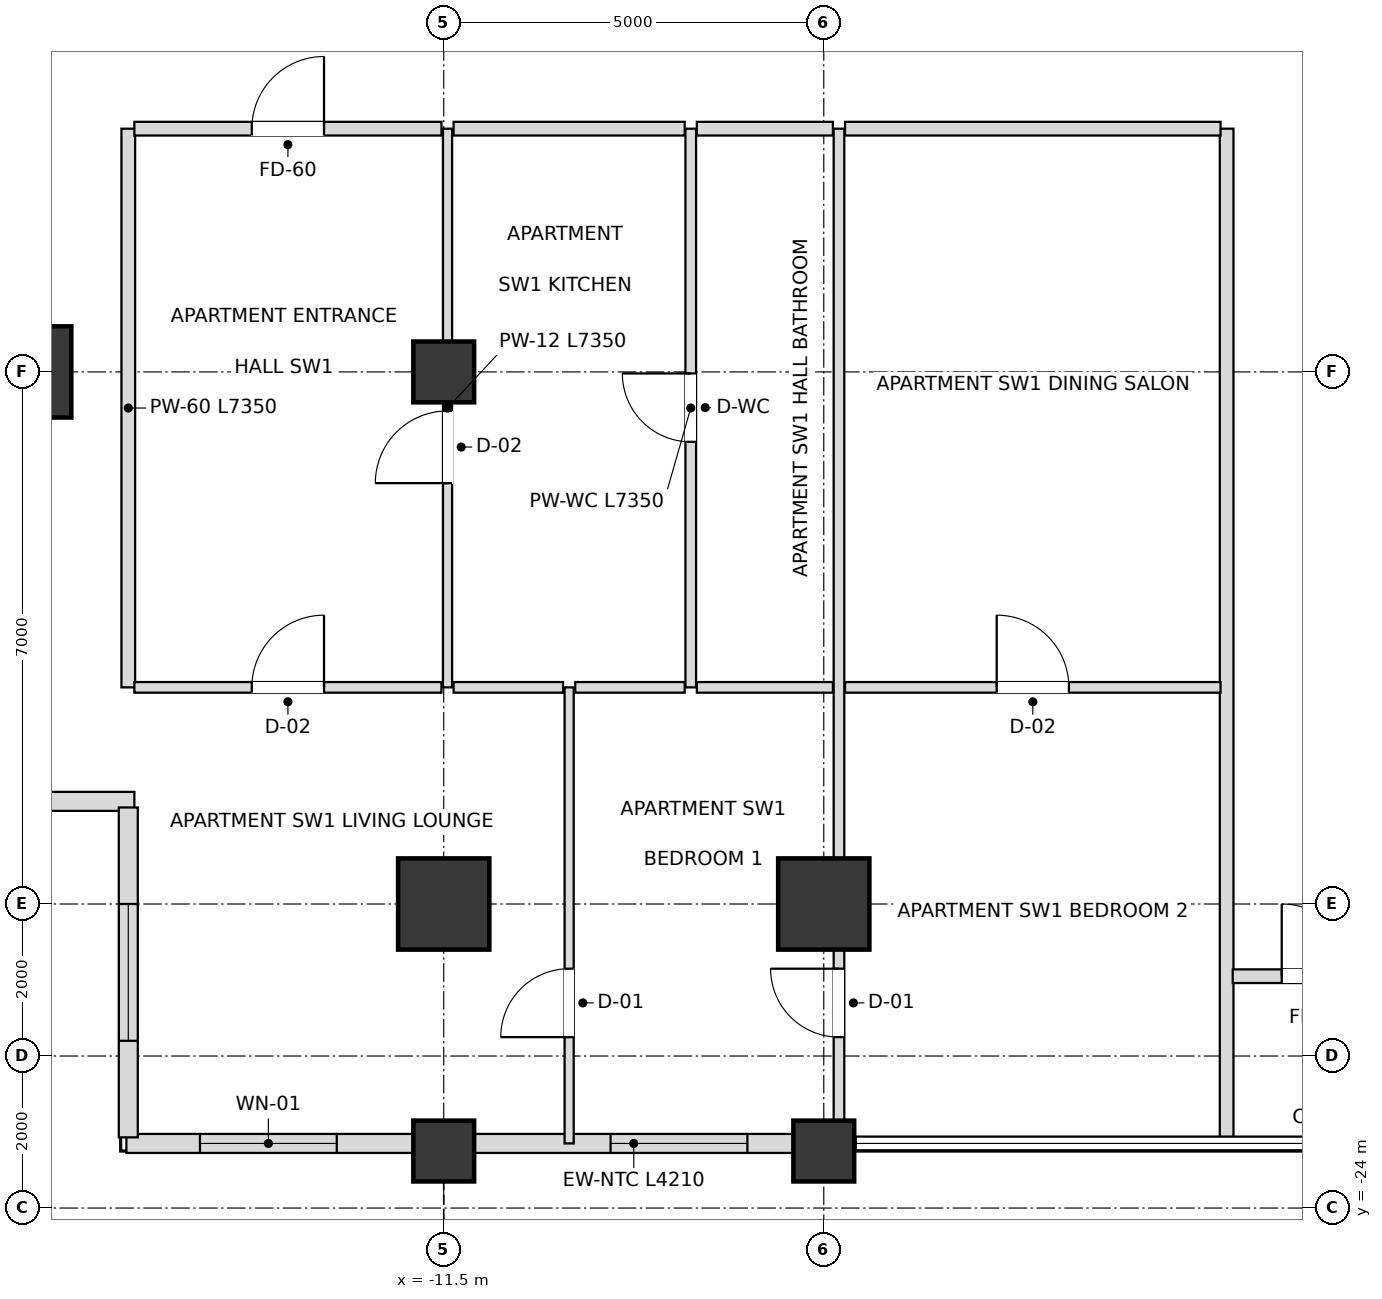
"""IFC4 building model, lengths in metres.
Left out: names, types, materials, properties, quantities, classifications, styles, units other than length and angle.
Written with IfcOpenShell. Run it as: python <this file> out.ifc"""

import sys

from ifc_helpers import new_model, si_unit, direction, frame, frame_2d, origin, origin_2d, place, context, subcontext, project, spatial, rectangle, extrude, element, fill, save


model = new_model("IFC4")
c1 = context("Model", 3, precision=1e-05, world=origin(), true_north=direction((0.0, 1.0)))
c2 = subcontext(c1, "Body", "Model", "MODEL_VIEW")
j1 = project(units=[si_unit("LENGTHUNIT", "METRE"), si_unit("PLANEANGLEUNIT", "RADIAN")], contexts=[c1])
p1 = place(None, origin())
s1 = spatial("IfcSite", under=j1, at=p1, CompositionType="ELEMENT")
p2 = place(p1, origin())
s2 = spatial("IfcBuilding", under=s1, at=p2, CompositionType="ELEMENT")
p3 = place(p2, frame((0.0, 0.0, 133.2)))
s3 = spatial("IfcBuildingStorey", under=s2, at=p3, CompositionType="ELEMENT", Elevation=133.2)
for number, where, z_axis, x_axis in (
    (1, (-11.5, -20.0, 0.0), (0.0, 0.0, 1.0), (1.0, 0.0, 0.0)),
    (2, (-6.5, -20.0, 0.0), (0.0, 0.0, 1.0), (1.0, 0.0, 0.0)),
    (3, (-17.0, -13.0, 0.0), (0.0, 0.0, 1.0), (1.0, 0.0, 0.0)),
):
    element("IfcColumn", number, at=place(p3, frame(where, z_axis=z_axis, x_axis=x_axis)), inside=s3, PredefinedType="USERDEFINED", context=c2, shape_type="SweptSolid", body=[
        extrude(rectangle(XDim=1.2, YDim=1.2, at=origin_2d()), origin(), (0.0, 0.0, 1.0), 3.6),
    ])
for number, where, z_axis, x_axis in (
    (4, (-11.5, -13.0, 0.0), (0.0, 0.0, 1.0), (1.0, 0.0, 0.0)),
    (5, (-11.5, -23.25, 0.0), (0.0, 0.0, 1.0), (1.0, 0.0, 0.0)),
    (6, (-6.5, -23.25, 0.0), (0.0, 0.0, 1.0), (1.0, 0.0, 0.0)),
):
    element("IfcColumn", number, at=place(p3, frame(where, z_axis=z_axis, x_axis=x_axis)), inside=s3, PredefinedType="COLUMN", context=c2, shape_type="SweptSolid", body=[
        extrude(rectangle(XDim=0.8, YDim=0.8, at=origin_2d()), origin(), (0.0, 0.0, 1.0), 3.6),
    ])
p4 = place(p3, frame((-15.675, -23.15, 0.0), z_axis=(0.0, 0.0, 1.0), x_axis=(1.0, 0.0, 0.0)))
e7 = element("IfcWall", 7, at=p4, inside=s3, PredefinedType="SOLIDWALL", context=c2, shape_type="SweptSolid", body=[
    extrude(rectangle(XDim=3.78, YDim=0.25, at=frame_2d((1.89, 0.0))), origin(), (0.0, 0.0, 1.0), 2.736),
])
p5 = place(p4, frame((0.968, 0.0, 0.72)))
e8 = element("IfcOpeningElement", 8, at=p5, cuts=e7, PredefinedType="OPENING", context=c2, shape_type="SweptSolid", body=[
    extrude(rectangle(XDim=1.8, YDim=1.68, at=frame_2d((0.9, 0.84))), frame((0.0, 0.135, 0.0), z_axis=(0.0, -1.0, 0.0), x_axis=(1.0, 0.0, 0.0)), (0.0, 0.0, 1.0), 0.27),
])
p6 = place(p3, frame((-11.105, -23.15, 0.0), z_axis=(0.0, 0.0, 1.0), x_axis=(1.0, 0.0, 0.0)))
e9 = element("IfcWall", 9, at=p6, inside=s3, PredefinedType="SOLIDWALL", context=c2, shape_type="SweptSolid", body=[
    extrude(rectangle(XDim=4.21, YDim=0.25, at=frame_2d((2.105, 0.0))), origin(), (0.0, 0.0, 1.0), 2.736),
])
p7 = place(p6, frame((1.8, 0.0, 0.72)))
e10 = element("IfcOpeningElement", 10, at=p7, cuts=e9, PredefinedType="OPENING", context=c2, shape_type="SweptSolid", body=[
    extrude(rectangle(XDim=1.8, YDim=1.68, at=frame_2d((0.9, 0.84))), frame((0.0, 0.135, 0.0), z_axis=(0.0, -1.0, 0.0), x_axis=(1.0, 0.0, 0.0)), (0.0, 0.0, 1.0), 0.27),
])
p8 = place(p3, frame((-20.23, -18.65, 0.0), z_axis=(0.0, 0.0, 1.0), x_axis=(1.0, 0.0, 0.0)))
e11 = element("IfcWall", 11, at=p8, inside=s3, PredefinedType="SOLIDWALL", context=c2, shape_type="SweptSolid", body=[
    extrude(rectangle(XDim=4.66, YDim=0.25, at=frame_2d((2.33, 0.0))), origin(), (0.0, 0.0, 1.0), 2.736),
])
p9 = place(p8, frame((1.43, 0.0, 0.72)))
e12 = element("IfcOpeningElement", 12, at=p9, cuts=e11, PredefinedType="OPENING", context=c2, shape_type="SweptSolid", body=[
    extrude(rectangle(XDim=1.8, YDim=1.68, at=frame_2d((0.9, 0.84))), frame((0.0, 0.135, 0.0), z_axis=(0.0, -1.0, 0.0), x_axis=(1.0, 0.0, 0.0)), (0.0, 0.0, 1.0), 0.27),
])
p10 = place(p3, frame((-15.65, -18.73, 0.0), z_axis=(0.0, 0.0, 1.0), x_axis=(0.0, -1.0, 0.0)))
e13 = element("IfcWall", 13, at=p10, inside=s3, PredefinedType="SOLIDWALL", context=c2, shape_type="SweptSolid", body=[
    extrude(rectangle(XDim=4.34, YDim=0.25, at=frame_2d((2.17, 0.0))), origin(), (0.0, 0.0, 1.0), 2.736),
])
p11 = place(p10, frame((1.27, 0.0, 0.72)))
e14 = element("IfcOpeningElement", 14, at=p11, cuts=e13, PredefinedType="OPENING", context=c2, shape_type="SweptSolid", body=[
    extrude(rectangle(XDim=1.8, YDim=1.68, at=frame_2d((0.9, 0.84))), frame((0.0, 0.135, 0.0), z_axis=(0.0, -1.0, 0.0), x_axis=(1.0, 0.0, 0.0)), (0.0, 0.0, 1.0), 0.27),
])
p12 = place(p3, frame((-15.65, -17.15, 0.0), z_axis=(0.0, 0.0, 1.0), x_axis=(0.0, 1.0, 0.0)))
e15 = element("IfcWall", 15, at=p12, inside=s3, PredefinedType="PARTITIONING", context=c2, shape_type="SweptSolid", body=[
    extrude(rectangle(XDim=7.35, YDim=0.18, at=frame_2d((3.675, 0.0))), origin(), (0.0, 0.0, 1.0), 2.736),
])
p13 = place(p3, frame((-11.45, -17.15, 0.0), z_axis=(0.0, 0.0, 1.0), x_axis=(0.0, 1.0, 0.0)))
e16 = element("IfcWall", 16, at=p13, inside=s3, PredefinedType="PARTITIONING", context=c2, shape_type="SweptSolid", body=[
    extrude(rectangle(XDim=7.35, YDim=0.12, at=frame_2d((3.675, 0.0))), origin(), (0.0, 0.0, 1.0), 2.736),
])
p14 = place(p13, frame((2.687, 0.0, 0.0)))
e17 = element("IfcOpeningElement", 17, at=p14, cuts=e16, PredefinedType="OPENING", context=c2, shape_type="SweptSolid", body=[
    extrude(rectangle(XDim=0.95, YDim=2.1, at=frame_2d((0.475, 1.05))), frame((0.0, 0.07, 0.0), z_axis=(0.0, -1.0, 0.0), x_axis=(1.0, 0.0, 0.0)), (0.0, 0.0, 1.0), 0.14),
])
p15 = place(p3, frame((-9.85, -23.15, 0.0), z_axis=(0.0, 0.0, 1.0), x_axis=(0.0, 1.0, 0.0)))
e18 = element("IfcWall", 18, at=p15, inside=s3, PredefinedType="PARTITIONING", context=c2, shape_type="SweptSolid", body=[
    extrude(rectangle(XDim=6.0, YDim=0.12, at=frame_2d((3.0, 0.0))), origin(), (0.0, 0.0, 1.0), 2.816),
])
p16 = place(p15, frame((1.399, 0.0, 0.0)))
e19 = element("IfcOpeningElement", 19, at=p16, cuts=e18, PredefinedType="OPENING", context=c2, shape_type="SweptSolid", body=[
    extrude(rectangle(XDim=0.9, YDim=2.1, at=frame_2d((0.45, 1.05))), frame((0.0, 0.07, 0.0), z_axis=(0.0, -1.0, 0.0), x_axis=(1.0, 0.0, 0.0)), (0.0, 0.0, 1.0), 0.14),
])
p17 = place(p3, frame((-8.25, -17.15, 0.0), z_axis=(0.0, 0.0, 1.0), x_axis=(0.0, 1.0, 0.0)))
e20 = element("IfcWall", 20, at=p17, inside=s3, PredefinedType="PARTITIONING", context=c2, shape_type="SweptSolid", body=[
    extrude(rectangle(XDim=7.35, YDim=0.14, at=frame_2d((3.675, 0.0))), origin(), (0.0, 0.0, 1.0), 2.816),
])
p18 = place(p17, frame((3.23, 0.0, 0.0)))
e21 = element("IfcOpeningElement", 21, at=p18, cuts=e20, PredefinedType="OPENING", context=c2, shape_type="SweptSolid", body=[
    extrude(rectangle(XDim=0.9, YDim=2.1, at=frame_2d((0.45, 1.05))), frame((0.0, 0.08, 0.0), z_axis=(0.0, -1.0, 0.0), x_axis=(1.0, 0.0, 0.0)), (0.0, 0.0, 1.0), 0.16),
])
p19 = place(p3, frame((-6.3, -23.15, 0.0), z_axis=(0.0, 0.0, 1.0), x_axis=(0.0, 1.0, 0.0)))
e22 = element("IfcWall", 22, at=p19, inside=s3, PredefinedType="PARTITIONING", context=c2, shape_type="SweptSolid", body=[
    extrude(rectangle(XDim=13.35, YDim=0.14, at=frame_2d((6.675, 0.0))), origin(), (0.0, 0.0, 1.0), 2.816),
])
p20 = place(p19, frame((1.399, 0.0, 0.0)))
e23 = element("IfcOpeningElement", 23, at=p20, cuts=e22, PredefinedType="OPENING", context=c2, shape_type="SweptSolid", body=[
    extrude(rectangle(XDim=0.9, YDim=2.1, at=frame_2d((0.45, 1.05))), frame((0.0, 0.08, 0.0), z_axis=(0.0, -1.0, 0.0), x_axis=(1.0, 0.0, 0.0)), (0.0, 0.0, 1.0), 0.16),
])
p21 = place(p3, frame((-1.2, -23.15, 0.0), z_axis=(0.0, 0.0, 1.0), x_axis=(0.0, 1.0, 0.0)))
e24 = element("IfcWall", 24, at=p21, inside=s3, PredefinedType="PARTITIONING", context=c2, shape_type="SweptSolid", body=[
    extrude(rectangle(XDim=13.35, YDim=0.18, at=frame_2d((6.675, 0.0))), origin(), (0.0, 0.0, 1.0), 2.816),
])
p22 = place(p3, frame((-1.12, -20.95, 0.0), z_axis=(0.0, 0.0, 1.0), x_axis=(1.0, 0.0, 0.0)))
e25 = element("IfcWall", 25, at=p22, inside=s3, PredefinedType="PARTITIONING", context=c2, shape_type="SweptSolid", body=[
    extrude(rectangle(XDim=2.24, YDim=0.18, at=frame_2d((1.12, 0.0))), origin(), (0.0, 0.0, 1.0), 3.38),
])
p23 = place(p22, frame((0.645, 0.0, 0.0)))
e26 = element("IfcOpeningElement", 26, at=p23, cuts=e25, PredefinedType="OPENING", context=c2, shape_type="SweptSolid", body=[
    extrude(rectangle(XDim=0.95, YDim=2.15, at=frame_2d((0.475, 1.075))), frame((0.0, 0.1, 0.0), z_axis=(0.0, -1.0, 0.0), x_axis=(1.0, 0.0, 0.0)), (0.0, 0.0, 1.0), 0.2),
])
p24 = place(p3, frame((-15.57, -17.15, 0.0), z_axis=(0.0, 0.0, 1.0), x_axis=(1.0, 0.0, 0.0)))
e27 = element("IfcWall", 27, at=p24, inside=s3, PredefinedType="PARTITIONING", context=c2, shape_type="SweptSolid", body=[
    extrude(rectangle(XDim=4.04, YDim=0.14, at=frame_2d((2.02, 0.0))), origin(), (0.0, 0.0, 1.0), 2.736),
])
p25 = place(p24, frame((1.545, 0.0, 0.0)))
e28 = element("IfcOpeningElement", 28, at=p25, cuts=e27, PredefinedType="OPENING", context=c2, shape_type="SweptSolid", body=[
    extrude(rectangle(XDim=0.95, YDim=2.1, at=frame_2d((0.475, 1.05))), frame((0.0, 0.08, 0.0), z_axis=(0.0, -1.0, 0.0), x_axis=(1.0, 0.0, 0.0)), (0.0, 0.0, 1.0), 0.16),
])
p26 = place(p3, frame((-11.37, -17.15, 0.0), z_axis=(0.0, 0.0, 1.0), x_axis=(1.0, 0.0, 0.0)))
e29 = element("IfcWall", 29, at=p26, inside=s3, PredefinedType="PARTITIONING", context=c2, shape_type="SweptSolid", body=[
    extrude(rectangle(XDim=1.44, YDim=0.14, at=frame_2d((0.72, 0.0))), origin(), (0.0, 0.0, 1.0), 3.38),
])
p27 = place(p3, frame((-9.77, -17.15, 0.0), z_axis=(0.0, 0.0, 1.0), x_axis=(1.0, 0.0, 0.0)))
e30 = element("IfcWall", 30, at=p27, inside=s3, PredefinedType="PARTITIONING", context=c2, shape_type="SweptSolid", body=[
    extrude(rectangle(XDim=1.44, YDim=0.14, at=frame_2d((0.72, 0.0))), origin(), (0.0, 0.0, 1.0), 3.38),
])
p28 = place(p3, frame((-8.17, -17.15, 0.0), z_axis=(0.0, 0.0, 1.0), x_axis=(1.0, 0.0, 0.0)))
e31 = element("IfcWall", 31, at=p28, inside=s3, PredefinedType="PARTITIONING", context=c2, shape_type="SweptSolid", body=[
    extrude(rectangle(XDim=1.79, YDim=0.14, at=frame_2d((0.895, 0.0))), origin(), (0.0, 0.0, 1.0), 2.816),
])
p29 = place(p3, frame((-6.22, -17.15, 0.0), z_axis=(0.0, 0.0, 1.0), x_axis=(1.0, 0.0, 0.0)))
e32 = element("IfcWall", 32, at=p29, inside=s3, PredefinedType="PARTITIONING", context=c2, shape_type="SweptSolid", body=[
    extrude(rectangle(XDim=4.94, YDim=0.14, at=frame_2d((2.47, 0.0))), origin(), (0.0, 0.0, 1.0), 3.38),
])
p30 = place(p29, frame((1.995, 0.0, 0.0)))
e33 = element("IfcOpeningElement", 33, at=p30, cuts=e32, PredefinedType="OPENING", context=c2, shape_type="SweptSolid", body=[
    extrude(rectangle(XDim=0.95, YDim=2.1, at=frame_2d((0.475, 1.05))), frame((0.0, 0.08, 0.0), z_axis=(0.0, -1.0, 0.0), x_axis=(1.0, 0.0, 0.0)), (0.0, 0.0, 1.0), 0.16),
])
p31 = place(p3, frame((-15.57, -9.8, 0.0), z_axis=(0.0, 0.0, 1.0), x_axis=(1.0, 0.0, 0.0)))
e34 = element("IfcWall", 34, at=p31, inside=s3, PredefinedType="PARTITIONING", context=c2, shape_type="SweptSolid", body=[
    extrude(rectangle(XDim=4.04, YDim=0.18, at=frame_2d((2.02, 0.0))), origin(), (0.0, 0.0, 1.0), 3.38),
])
p32 = place(p31, frame((1.545, 0.0, 0.0)))
e35 = element("IfcOpeningElement", 35, at=p32, cuts=e34, PredefinedType="OPENING", context=c2, shape_type="SweptSolid", body=[
    extrude(rectangle(XDim=0.95, YDim=2.15, at=frame_2d((0.475, 1.075))), frame((0.0, 0.1, 0.0), z_axis=(0.0, -1.0, 0.0), x_axis=(1.0, 0.0, 0.0)), (0.0, 0.0, 1.0), 0.2),
])
p33 = place(p3, frame((-11.37, -9.8, 0.0), z_axis=(0.0, 0.0, 1.0), x_axis=(1.0, 0.0, 0.0)))
e36 = element("IfcWall", 36, at=p33, inside=s3, PredefinedType="PARTITIONING", context=c2, shape_type="SweptSolid", body=[
    extrude(rectangle(XDim=3.04, YDim=0.18, at=frame_2d((1.52, 0.0))), origin(), (0.0, 0.0, 1.0), 3.38),
])
p34 = place(p3, frame((-8.17, -9.8, 0.0), z_axis=(0.0, 0.0, 1.0), x_axis=(1.0, 0.0, 0.0)))
e37 = element("IfcWall", 37, at=p34, inside=s3, PredefinedType="PARTITIONING", context=c2, shape_type="SweptSolid", body=[
    extrude(rectangle(XDim=1.79, YDim=0.18, at=frame_2d((0.895, 0.0))), origin(), (0.0, 0.0, 1.0), 2.816),
])
p35 = place(p3, frame((-6.22, -9.8, 0.0), z_axis=(0.0, 0.0, 1.0), x_axis=(1.0, 0.0, 0.0)))
e38 = element("IfcWall", 38, at=p35, inside=s3, PredefinedType="PARTITIONING", context=c2, shape_type="SweptSolid", body=[
    extrude(rectangle(XDim=4.94, YDim=0.18, at=frame_2d((2.47, 0.0))), origin(), (0.0, 0.0, 1.0), 3.38),
])
p36 = place(p5, origin())
e39 = element("IfcWindow", 39, at=p36, inside=s3, PartitioningType="SINGLE_PANEL", PredefinedType="WINDOW", context=c2, shape_type="SweptSolid", body=[
    extrude(rectangle(XDim=1.8, YDim=1.68, at=frame_2d((0.9, 0.84))), frame((0.0, 0.03, 0.0), z_axis=(0.0, -1.0, 0.0), x_axis=(1.0, 0.0, 0.0)), (0.0, 0.0, 1.0), 0.06),
])
fill(e8, e39)
p37 = place(p7, origin())
e40 = element("IfcWindow", 40, at=p37, inside=s3, PartitioningType="SINGLE_PANEL", PredefinedType="WINDOW", context=c2, shape_type="SweptSolid", body=[
    extrude(rectangle(XDim=1.8, YDim=1.68, at=frame_2d((0.9, 0.84))), frame((0.0, 0.03, 0.0), z_axis=(0.0, -1.0, 0.0), x_axis=(1.0, 0.0, 0.0)), (0.0, 0.0, 1.0), 0.06),
])
fill(e10, e40)
p38 = place(p11, origin())
e41 = element("IfcWindow", 41, at=p38, inside=s3, PartitioningType="SINGLE_PANEL", PredefinedType="WINDOW", context=c2, shape_type="SweptSolid", body=[
    extrude(rectangle(XDim=1.8, YDim=1.68, at=frame_2d((0.9, 0.84))), frame((0.0, 0.03, 0.0), z_axis=(0.0, -1.0, 0.0), x_axis=(1.0, 0.0, 0.0)), (0.0, 0.0, 1.0), 0.06),
])
fill(e14, e41)
p39 = place(p23, origin())
e42 = element("IfcDoor", 42, at=p39, inside=s3, OperationType="SINGLE_SWING_LEFT", PredefinedType="DOOR", context=c2, shape_type="SweptSolid", body=[
    extrude(rectangle(XDim=0.95, YDim=2.15, at=frame_2d((0.475, 1.075))), frame((0.0, 0.025, 0.0), z_axis=(0.0, -1.0, 0.0), x_axis=(1.0, 0.0, 0.0)), (0.0, 0.0, 1.0), 0.05),
])
fill(e26, e42)
p40 = place(p32, origin())
e43 = element("IfcDoor", 43, at=p40, inside=s3, OperationType="SINGLE_SWING_RIGHT", PredefinedType="DOOR", context=c2, shape_type="SweptSolid", body=[
    extrude(rectangle(XDim=0.95, YDim=2.15, at=frame_2d((0.475, 1.075))), frame((0.0, 0.025, 0.0), z_axis=(0.0, -1.0, 0.0), x_axis=(1.0, 0.0, 0.0)), (0.0, 0.0, 1.0), 0.05),
])
fill(e35, e43)
p41 = place(p14, origin())
e44 = element("IfcDoor", 44, at=p41, inside=s3, OperationType="SINGLE_SWING_LEFT", PredefinedType="DOOR", context=c2, shape_type="SweptSolid", body=[
    extrude(rectangle(XDim=0.95, YDim=2.1, at=frame_2d((0.475, 1.05))), frame((0.0, 0.025, 0.0), z_axis=(0.0, -1.0, 0.0), x_axis=(1.0, 0.0, 0.0)), (0.0, 0.0, 1.0), 0.05),
])
fill(e17, e44)
p42 = place(p18, origin())
e45 = element("IfcDoor", 45, at=p42, inside=s3, OperationType="SINGLE_SWING_RIGHT", PredefinedType="DOOR", context=c2, shape_type="SweptSolid", body=[
    extrude(rectangle(XDim=0.9, YDim=2.1, at=frame_2d((0.45, 1.05))), frame((0.0, 0.025, 0.0), z_axis=(0.0, -1.0, 0.0), x_axis=(1.0, 0.0, 0.0)), (0.0, 0.0, 1.0), 0.05),
])
fill(e21, e45)
p43 = place(p30, origin())
e46 = element("IfcDoor", 46, at=p43, inside=s3, OperationType="SINGLE_SWING_LEFT", PredefinedType="DOOR", context=c2, shape_type="SweptSolid", body=[
    extrude(rectangle(XDim=0.95, YDim=2.1, at=frame_2d((0.475, 1.05))), frame((0.0, 0.025, 0.0), z_axis=(0.0, -1.0, 0.0), x_axis=(1.0, 0.0, 0.0)), (0.0, 0.0, 1.0), 0.05),
])
fill(e33, e46)
p44 = place(p25, origin())
e47 = element("IfcDoor", 47, at=p44, inside=s3, OperationType="SINGLE_SWING_RIGHT", PredefinedType="DOOR", context=c2, shape_type="SweptSolid", body=[
    extrude(rectangle(XDim=0.95, YDim=2.1, at=frame_2d((0.475, 1.05))), frame((0.0, 0.025, 0.0), z_axis=(0.0, -1.0, 0.0), x_axis=(1.0, 0.0, 0.0)), (0.0, 0.0, 1.0), 0.05),
])
fill(e28, e47)
p45 = place(p16, origin())
e48 = element("IfcDoor", 48, at=p45, inside=s3, OperationType="SINGLE_SWING_LEFT", PredefinedType="DOOR", context=c2, shape_type="SweptSolid", body=[
    extrude(rectangle(XDim=0.9, YDim=2.1, at=frame_2d((0.45, 1.05))), frame((0.0, 0.025, 0.0), z_axis=(0.0, -1.0, 0.0), x_axis=(1.0, 0.0, 0.0)), (0.0, 0.0, 1.0), 0.05),
])
fill(e19, e48)
p46 = place(p20, origin())
e49 = element("IfcDoor", 49, at=p46, inside=s3, OperationType="SINGLE_SWING_RIGHT", PredefinedType="DOOR", context=c2, shape_type="SweptSolid", body=[
    extrude(rectangle(XDim=0.9, YDim=2.1, at=frame_2d((0.45, 1.05))), frame((0.0, 0.025, 0.0), z_axis=(0.0, -1.0, 0.0), x_axis=(1.0, 0.0, 0.0)), (0.0, 0.0, 1.0), 0.05),
])
fill(e23, e49)
save(model, sys.argv[1])
